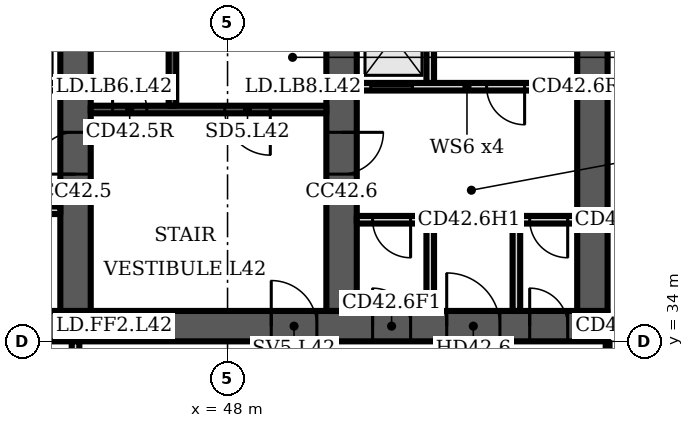
"""IFC4 building model, lengths in metres.
Left out: names, types, materials, properties, quantities, classifications, styles, units other than length and angle.
Written with IfcOpenShell. Run it as: python <this file> out.ifc"""

import sys

from ifc_helpers import new_model, si_unit, direction, frame, frame_2d, origin, place, context, subcontext, project, spatial, polyline, rectangle, outline, extrude, element, fill, save


model = new_model("IFC4")
c1 = context("Model", 3, precision=1e-05, world=origin(), true_north=direction((0.0, 1.0)))
c2 = subcontext(c1, "Body", "Model", "MODEL_VIEW")
j1 = project(units=[si_unit("LENGTHUNIT", "METRE"), si_unit("PLANEANGLEUNIT", "RADIAN")], contexts=[c1])
p1 = place(None, origin())
s1 = spatial("IfcSite", under=j1, at=p1, CompositionType="ELEMENT")
p2 = place(p1, origin())
s2 = spatial("IfcBuilding", under=s1, at=p2, CompositionType="ELEMENT")
p3 = place(p2, frame((0.0, 0.0, 173.5)))
s3 = spatial("IfcBuildingStorey", under=s2, at=p3, CompositionType="ELEMENT", Elevation=173.5)
p4 = place(p3, frame((16.0, 34.4, 0.0), z_axis=(0.0, 0.0, 1.0), x_axis=(1.0, 0.0, 0.0)))
e1 = element("IfcWall", 1, at=p4, inside=s3, PredefinedType="SHEAR", context=c2, shape_type="SweptSolid", body=[
    extrude(rectangle(XDim=42.0, YDim=0.8, at=frame_2d((21.0, 0.0))), origin(), (0.0, 0.0, 1.0), 3.6),
])
p5 = place(p4, frame((3.2, 0.0, 0.0)))
e2 = element("IfcOpeningElement", 2, at=p5, cuts=e1, PredefinedType="OPENING", context=c2, shape_type="SweptSolid", body=[
    extrude(rectangle(XDim=1.0, YDim=2.1, at=frame_2d((0.5, 1.05))), frame((0.0, 0.41, 0.0), z_axis=(0.0, -1.0, 0.0), x_axis=(1.0, 0.0, 0.0)), (0.0, 0.0, 1.0), 0.82),
])
p6 = place(p4, frame((7.65, 0.0, 0.0)))
e3 = element("IfcOpeningElement", 3, at=p6, cuts=e1, PredefinedType="OPENING", context=c2, shape_type="SweptSolid", body=[
    extrude(rectangle(XDim=1.2, YDim=2.1, at=frame_2d((0.6, 1.05))), frame((0.0, 0.41, 0.0), z_axis=(0.0, -1.0, 0.0), x_axis=(1.0, 0.0, 0.0)), (0.0, 0.0, 1.0), 0.82),
])
p7 = place(p4, frame((14.767, 0.0, 0.0)))
e4 = element("IfcOpeningElement", 4, at=p7, cuts=e1, PredefinedType="OPENING", context=c2, shape_type="SweptSolid", body=[
    extrude(rectangle(XDim=1.1, YDim=2.1, at=frame_2d((0.55, 1.05))), frame((0.0, 0.41, 0.0), z_axis=(0.0, -1.0, 0.0), x_axis=(1.0, 0.0, 0.0)), (0.0, 0.0, 1.0), 0.82),
])
p8 = place(p4, frame((19.133, 0.0, 0.0)))
e5 = element("IfcOpeningElement", 5, at=p8, cuts=e1, PredefinedType="OPENING", context=c2, shape_type="SweptSolid", body=[
    extrude(rectangle(XDim=1.1, YDim=2.1, at=frame_2d((0.55, 1.05))), frame((0.0, 0.41, 0.0), z_axis=(0.0, -1.0, 0.0), x_axis=(1.0, 0.0, 0.0)), (0.0, 0.0, 1.0), 0.82),
])
p9 = place(p4, frame((16.8, 0.0, 0.0)))
e6 = element("IfcOpeningElement", 6, at=p9, cuts=e1, PredefinedType="OPENING", context=c2, shape_type="SweptSolid", body=[
    extrude(rectangle(XDim=1.4, YDim=2.1, at=frame_2d((0.7, 1.05))), frame((0.0, 0.41, 0.0), z_axis=(0.0, -1.0, 0.0), x_axis=(1.0, 0.0, 0.0)), (0.0, 0.0, 1.0), 0.82),
])
p10 = place(p4, frame((21.767, 0.0, 0.0)))
e7 = element("IfcOpeningElement", 7, at=p10, cuts=e1, PredefinedType="OPENING", context=c2, shape_type="SweptSolid", body=[
    extrude(rectangle(XDim=1.1, YDim=2.1, at=frame_2d((0.55, 1.05))), frame((0.0, 0.41, 0.0), z_axis=(0.0, -1.0, 0.0), x_axis=(1.0, 0.0, 0.0)), (0.0, 0.0, 1.0), 0.82),
])
p11 = place(p4, frame((23.95, 0.0, 0.0)))
e8 = element("IfcOpeningElement", 8, at=p11, cuts=e1, PredefinedType="OPENING", context=c2, shape_type="SweptSolid", body=[
    extrude(rectangle(XDim=1.1, YDim=2.1, at=frame_2d((0.55, 1.05))), frame((0.0, 0.41, 0.0), z_axis=(0.0, -1.0, 0.0), x_axis=(1.0, 0.0, 0.0)), (0.0, 0.0, 1.0), 0.82),
])
p12 = place(p4, frame((26.133, 0.0, 0.0)))
e9 = element("IfcOpeningElement", 9, at=p12, cuts=e1, PredefinedType="OPENING", context=c2, shape_type="SweptSolid", body=[
    extrude(rectangle(XDim=1.1, YDim=2.1, at=frame_2d((0.55, 1.05))), frame((0.0, 0.41, 0.0), z_axis=(0.0, -1.0, 0.0), x_axis=(1.0, 0.0, 0.0)), (0.0, 0.0, 1.0), 0.82),
])
p13 = place(p4, frame((33.15, 0.0, 0.0)))
e10 = element("IfcOpeningElement", 10, at=p13, cuts=e1, PredefinedType="OPENING", context=c2, shape_type="SweptSolid", body=[
    extrude(rectangle(XDim=1.2, YDim=2.1, at=frame_2d((0.6, 1.05))), frame((0.0, 0.41, 0.0), z_axis=(0.0, -1.0, 0.0), x_axis=(1.0, 0.0, 0.0)), (0.0, 0.0, 1.0), 0.82),
])
p14 = place(p4, frame((35.817, 0.0, 0.0)))
e11 = element("IfcOpeningElement", 11, at=p14, cuts=e1, PredefinedType="OPENING", context=c2, shape_type="SweptSolid", body=[
    extrude(rectangle(XDim=1.0, YDim=2.1, at=frame_2d((0.5, 1.05))), frame((0.0, 0.41, 0.0), z_axis=(0.0, -1.0, 0.0), x_axis=(1.0, 0.0, 0.0)), (0.0, 0.0, 1.0), 0.82),
])
p15 = place(p4, frame((39.95, 0.0, 0.0)))
e12 = element("IfcOpeningElement", 12, at=p15, cuts=e1, PredefinedType="OPENING", context=c2, shape_type="SweptSolid", body=[
    extrude(rectangle(XDim=1.0, YDim=2.1, at=frame_2d((0.5, 1.05))), frame((0.0, 0.41, 0.0), z_axis=(0.0, -1.0, 0.0), x_axis=(1.0, 0.0, 0.0)), (0.0, 0.0, 1.0), 0.82),
])
p16 = place(p4, frame((37.767, 0.0, 0.0)))
e13 = element("IfcOpeningElement", 13, at=p16, cuts=e1, PredefinedType="OPENING", context=c2, shape_type="SweptSolid", body=[
    extrude(rectangle(XDim=1.4, YDim=2.1, at=frame_2d((0.7, 1.05))), frame((0.0, 0.41, 0.0), z_axis=(0.0, -1.0, 0.0), x_axis=(1.0, 0.0, 0.0)), (0.0, 0.0, 1.0), 0.82),
])
p17 = place(p3, frame((44.0, 34.8, 0.0), z_axis=(0.0, 0.0, 1.0), x_axis=(0.0, 1.0, 0.0)))
e14 = element("IfcWall", 14, at=p17, inside=s3, PredefinedType="SHEAR", context=c2, shape_type="SweptSolid", body=[
    extrude(rectangle(XDim=14.374, YDim=0.8, at=frame_2d((7.187, 0.0))), origin(), (0.0, 0.0, 1.0), 3.6),
])
p18 = place(p17, frame((11.312, 0.0, 0.0)))
e15 = element("IfcOpeningElement", 15, at=p18, cuts=e14, PredefinedType="OPENING", context=c2, shape_type="SweptSolid", body=[
    extrude(rectangle(XDim=1.0, YDim=2.1, at=frame_2d((0.5, 1.05))), frame((0.0, 0.41, 0.0), z_axis=(0.0, -1.0, 0.0), x_axis=(1.0, 0.0, 0.0)), (0.0, 0.0, 1.0), 0.82),
])
p19 = place(p17, frame((3.6, 0.0, 0.0)))
e16 = element("IfcOpeningElement", 16, at=p19, cuts=e14, PredefinedType="OPENING", context=c2, shape_type="SweptSolid", body=[
    extrude(rectangle(XDim=1.1, YDim=2.1, at=frame_2d((0.55, 1.05))), frame((0.0, 0.41, 0.0), z_axis=(0.0, -1.0, 0.0), x_axis=(1.0, 0.0, 0.0)), (0.0, 0.0, 1.0), 0.82),
])
p20 = place(p3, frame((51.0, 34.8, 0.0), z_axis=(0.0, 0.0, 1.0), x_axis=(0.0, 1.0, 0.0)))
e17 = element("IfcWall", 17, at=p20, inside=s3, PredefinedType="SHEAR", context=c2, shape_type="SweptSolid", body=[
    extrude(rectangle(XDim=13.762, YDim=0.8, at=frame_2d((6.881, 0.0))), origin(), (0.0, 0.0, 1.0), 3.6),
])
p21 = place(p20, frame((3.6, 0.0, 0.0)))
e18 = element("IfcOpeningElement", 18, at=p21, cuts=e17, PredefinedType="OPENING", context=c2, shape_type="SweptSolid", body=[
    extrude(rectangle(XDim=1.1, YDim=2.1, at=frame_2d((0.55, 1.05))), frame((0.0, 0.41, 0.0), z_axis=(0.0, -1.0, 0.0), x_axis=(1.0, 0.0, 0.0)), (0.0, 0.0, 1.0), 0.82),
])
p22 = place(p3, frame((57.6, 34.8, 0.0), z_axis=(0.0, 0.0, 1.0), x_axis=(0.0, 1.0, 0.0)))
e19 = element("IfcWall", 19, at=p22, inside=s3, PredefinedType="SHEAR", context=c2, shape_type="SweptSolid", body=[
    extrude(rectangle(XDim=13.184, YDim=0.8, at=frame_2d((6.592, 0.0))), origin(), (0.0, 0.0, 1.0), 3.6),
])
p23 = place(p3, frame((37.4, 40.7, 0.0), z_axis=(0.0, 0.0, 1.0), x_axis=(1.0, 0.0, 0.0)))
e20 = element("IfcWall", 20, at=p23, inside=s3, PredefinedType="PARTITIONING", context=c2, shape_type="SweptSolid", body=[
    extrude(rectangle(XDim=6.2, YDim=0.2, at=frame_2d((3.1, 0.0))), origin(), (0.0, 0.0, 1.0), 3.2),
])
p24 = place(p23, frame((0.367, 0.0, 0.0)))
e21 = element("IfcOpeningElement", 21, at=p24, cuts=e20, PredefinedType="OPENING", context=c2, shape_type="SweptSolid", body=[
    extrude(rectangle(XDim=1.1, YDim=2.1, at=frame_2d((0.55, 1.05))), frame((0.0, 0.11, 0.0), z_axis=(0.0, -1.0, 0.0), x_axis=(1.0, 0.0, 0.0)), (0.0, 0.0, 1.0), 0.22),
])
p25 = place(p23, frame((2.55, 0.0, 0.0)))
e22 = element("IfcOpeningElement", 22, at=p25, cuts=e20, PredefinedType="OPENING", context=c2, shape_type="SweptSolid", body=[
    extrude(rectangle(XDim=1.1, YDim=2.1, at=frame_2d((0.55, 1.05))), frame((0.0, 0.11, 0.0), z_axis=(0.0, -1.0, 0.0), x_axis=(1.0, 0.0, 0.0)), (0.0, 0.0, 1.0), 0.22),
])
p26 = place(p23, frame((4.733, 0.0, 0.0)))
e23 = element("IfcOpeningElement", 23, at=p26, cuts=e20, PredefinedType="OPENING", context=c2, shape_type="SweptSolid", body=[
    extrude(rectangle(XDim=1.1, YDim=2.1, at=frame_2d((0.55, 1.05))), frame((0.0, 0.11, 0.0), z_axis=(0.0, -1.0, 0.0), x_axis=(1.0, 0.0, 0.0)), (0.0, 0.0, 1.0), 0.22),
])
p27 = place(p3, frame((0.0, 0.0, -0.0)))
e24 = element("IfcWall", 24, at=p27, inside=s3, PredefinedType="PARTITIONING", context=c2, shape_type="SweptSolid", body=[
    extrude(outline(polyline([(41.567, 37.1), (39.433, 37.1), (39.433, 34.8), (39.233, 34.8), (39.233, 37.65), (37.4, 37.65), (37.4, 37.85), (39.233, 37.85), (39.433, 37.85), (39.433, 37.3), (41.567, 37.3), (41.567, 37.55), (41.767, 37.55), (43.6, 37.55), (43.6, 37.35), (41.767, 37.35), (41.767, 34.8), (41.567, 34.8), (41.567, 37.1)])), origin(), (0.0, 0.0, 1.0), 3.2),
])
p28 = place(p3, frame((0.0, 0.0, -0.0)))
e25 = element("IfcWall", 25, at=p28, inside=s3, PredefinedType="PARTITIONING", context=c2, shape_type="SweptSolid", body=[
    extrude(outline(polyline([(39.433, 40.8), (39.233, 40.8), (39.233, 43.8), (37.4, 43.8), (37.4, 44.0), (43.6, 44.0), (43.6, 43.8), (41.767, 43.8), (41.767, 40.8), (41.567, 40.8), (41.567, 43.8), (39.433, 43.8), (39.433, 40.8)])), origin(), (0.0, 0.0, 1.0), 3.2),
])
p29 = place(p3, frame((44.4, 40.1, 0.0), z_axis=(0.0, 0.0, 1.0), x_axis=(1.0, 0.0, 0.0)))
e26 = element("IfcWall", 26, at=p29, inside=s3, PredefinedType="SHEAR", context=c2, shape_type="SweptSolid", body=[
    extrude(rectangle(XDim=6.2, YDim=0.2, at=frame_2d((3.1, 0.0))), origin(), (0.0, 0.0, 1.0), 3.2),
])
p30 = place(p29, frame((3.525, 0.0, 0.0)))
e27 = element("IfcOpeningElement", 27, at=p30, cuts=e26, PredefinedType="OPENING", context=c2, shape_type="SweptSolid", body=[
    extrude(rectangle(XDim=1.2, YDim=2.1, at=frame_2d((0.6, 1.05))), frame((0.0, 0.11, 0.0), z_axis=(0.0, -1.0, 0.0), x_axis=(1.0, 0.0, 0.0)), (0.0, 0.0, 1.0), 0.22),
])
p31 = place(p29, frame((0.575, 0.0, 0.0)))
e28 = element("IfcOpeningElement", 28, at=p31, cuts=e26, PredefinedType="OPENING", context=c2, shape_type="SweptSolid", body=[
    extrude(rectangle(XDim=0.9, YDim=2.1, at=frame_2d((0.45, 1.05))), frame((0.0, 0.11, 0.0), z_axis=(0.0, -1.0, 0.0), x_axis=(1.0, 0.0, 0.0)), (0.0, 0.0, 1.0), 0.22),
])
p32 = place(p3, frame((46.55, 40.2, 0.0), z_axis=(0.0, 0.0, 1.0), x_axis=(0.0, 1.0, 0.0)))
e29 = element("IfcWall", 29, at=p32, inside=s3, PredefinedType="SHEAR", context=c2, shape_type="SweptSolid", body=[
    extrude(rectangle(XDim=7.2, YDim=0.2, at=frame_2d((3.6, 0.0))), origin(), (0.0, 0.0, 1.0), 3.2),
])
p33 = place(p3, frame((51.4, 37.2, 0.0), z_axis=(0.0, 0.0, 1.0), x_axis=(1.0, 0.0, 0.0)))
e30 = element("IfcWall", 30, at=p33, inside=s3, PredefinedType="PARTITIONING", context=c2, shape_type="SweptSolid", body=[
    extrude(rectangle(XDim=1.833, YDim=0.2, at=frame_2d((0.917, 0.0))), origin(), (0.0, 0.0, 1.0), 3.2),
])
p34 = place(p33, frame((0.417, 0.0, 0.0)))
e31 = element("IfcOpeningElement", 31, at=p34, cuts=e30, PredefinedType="OPENING", context=c2, shape_type="SweptSolid", body=[
    extrude(rectangle(XDim=1.0, YDim=2.1, at=frame_2d((0.5, 1.05))), frame((0.0, 0.11, 0.0), z_axis=(0.0, -1.0, 0.0), x_axis=(1.0, 0.0, 0.0)), (0.0, 0.0, 1.0), 0.22),
])
p35 = place(p3, frame((55.7, 37.2, 0.0), z_axis=(0.0, 0.0, 1.0), x_axis=(1.0, 0.0, 0.0)))
e32 = element("IfcWall", 32, at=p35, inside=s3, PredefinedType="PARTITIONING", context=c2, shape_type="SweptSolid", body=[
    extrude(rectangle(XDim=1.5, YDim=0.2, at=frame_2d((0.75, 0.0))), origin(), (0.0, 0.0, 1.0), 3.2),
])
p36 = place(p35, frame((0.25, 0.0, 0.0)))
e33 = element("IfcOpeningElement", 33, at=p36, cuts=e32, PredefinedType="OPENING", context=c2, shape_type="SweptSolid", body=[
    extrude(rectangle(XDim=1.0, YDim=2.1, at=frame_2d((0.5, 1.05))), frame((0.0, 0.11, 0.0), z_axis=(0.0, -1.0, 0.0), x_axis=(1.0, 0.0, 0.0)), (0.0, 0.0, 1.0), 0.22),
])
p37 = place(p3, frame((51.4, 40.7, 0.0), z_axis=(0.0, 0.0, 1.0), x_axis=(1.0, 0.0, 0.0)))
e34 = element("IfcWall", 34, at=p37, inside=s3, PredefinedType="PARTITIONING", context=c2, shape_type="SweptSolid", body=[
    extrude(rectangle(XDim=5.8, YDim=0.2, at=frame_2d((2.9, 0.0))), origin(), (0.0, 0.0, 1.0), 3.2),
])
p38 = place(p37, frame((0.367, 0.0, 0.0)))
e35 = element("IfcOpeningElement", 35, at=p38, cuts=e34, PredefinedType="OPENING", context=c2, shape_type="SweptSolid", body=[
    extrude(rectangle(XDim=1.1, YDim=2.1, at=frame_2d((0.55, 1.05))), frame((0.0, 0.11, 0.0), z_axis=(0.0, -1.0, 0.0), x_axis=(1.0, 0.0, 0.0)), (0.0, 0.0, 1.0), 0.22),
])
p39 = place(p37, frame((3.417, 0.0, 0.0)))
e36 = element("IfcOpeningElement", 36, at=p39, cuts=e34, PredefinedType="OPENING", context=c2, shape_type="SweptSolid", body=[
    extrude(rectangle(XDim=1.0, YDim=2.1, at=frame_2d((0.5, 1.05))), frame((0.0, 0.11, 0.0), z_axis=(0.0, -1.0, 0.0), x_axis=(1.0, 0.0, 0.0)), (0.0, 0.0, 1.0), 0.22),
])
p40 = place(p3, frame((0.0, 0.0, -0.0)))
e37 = element("IfcWall", 37, at=p40, inside=s3, PredefinedType="PARTITIONING", context=c2, shape_type="SweptSolid", body=[
    extrude(outline(polyline([(53.233, 34.8), (53.233, 37.3), (53.433, 37.3), (53.433, 34.8), (53.233, 34.8)])), origin(), (0.0, 0.0, 1.0), 3.2),
])
p41 = place(p3, frame((0.0, 0.0, -0.0)))
e38 = element("IfcWall", 38, at=p41, inside=s3, PredefinedType="PARTITIONING", context=c2, shape_type="SweptSolid", body=[
    extrude(outline(polyline([(55.5, 34.8), (55.5, 37.3), (55.7, 37.3), (55.7, 34.8), (55.5, 34.8)])), origin(), (0.0, 0.0, 1.0), 3.2),
])
p42 = place(p3, frame((0.0, 0.0, -0.0)))
e39 = element("IfcWall", 39, at=p42, inside=s3, PredefinedType="PARTITIONING", context=c2, shape_type="SweptSolid", body=[
    extrude(outline(polyline([(53.433, 40.8), (53.433, 43.8), (53.233, 43.8), (53.233, 40.8), (53.433, 40.8)])), origin(), (0.0, 0.0, 1.0), 3.2),
])
p43 = place(p3, frame((44.0, 30.5, 0.0), z_axis=(0.0, 0.0, 1.0), x_axis=(0.0, 1.0, 0.0)))
e40 = element("IfcWall", 40, at=p43, inside=s3, PredefinedType="PARTITIONING", context=c2, shape_type="SweptSolid", body=[
    extrude(rectangle(XDim=3.5, YDim=0.2, at=frame_2d((1.75, 0.0))), origin(), (0.0, 0.0, 1.0), 3.2),
])
p44 = place(p43, frame((1.2, 0.0, 0.0)))
e41 = element("IfcOpeningElement", 41, at=p44, cuts=e40, PredefinedType="OPENING", context=c2, shape_type="SweptSolid", body=[
    extrude(rectangle(XDim=1.1, YDim=2.1, at=frame_2d((0.55, 1.05))), frame((0.0, 0.11, 0.0), z_axis=(0.0, -1.0, 0.0), x_axis=(1.0, 0.0, 0.0)), (0.0, 0.0, 1.0), 0.22),
])
p45 = place(p3, frame((58.0, 31.4, 0.0), z_axis=(0.0, 0.0, 1.0), x_axis=(0.0, 1.0, 0.0)))
e42 = element("IfcWall", 42, at=p45, inside=s3, PredefinedType="PARTITIONING", context=c2, shape_type="SweptSolid", body=[
    extrude(rectangle(XDim=2.58, YDim=0.1, at=frame_2d((1.29, 0.0))), origin(), (0.0, 0.0, 1.0), 3.2),
])
p46 = place(p30, origin())
e43 = element("IfcDoor", 43, at=p46, inside=s3, OperationType="SINGLE_SWING_RIGHT", PredefinedType="DOOR", context=c2, shape_type="SweptSolid", body=[
    extrude(rectangle(XDim=1.2, YDim=2.1, at=frame_2d((0.6, 1.05))), frame((0.0, 0.025, 0.0), z_axis=(0.0, -1.0, 0.0), x_axis=(1.0, 0.0, 0.0)), (0.0, 0.0, 1.0), 0.05),
])
fill(e27, e43)
p47 = place(p31, origin())
e44 = element("IfcDoor", 44, at=p47, inside=s3, OperationType="SINGLE_SWING_LEFT", PredefinedType="DOOR", context=c2, shape_type="SweptSolid", body=[
    extrude(rectangle(XDim=0.9, YDim=2.1, at=frame_2d((0.45, 1.05))), frame((0.0, 0.025, 0.0), z_axis=(0.0, -1.0, 0.0), x_axis=(1.0, 0.0, 0.0)), (0.0, 0.0, 1.0), 0.05),
])
fill(e28, e44)
p48 = place(p13, origin())
e45 = element("IfcDoor", 45, at=p48, inside=s3, OperationType="SINGLE_SWING_LEFT", PredefinedType="DOOR", context=c2, shape_type="SweptSolid", body=[
    extrude(rectangle(XDim=1.2, YDim=2.1, at=frame_2d((0.6, 1.05))), frame((0.0, 0.025, 0.0), z_axis=(0.0, -1.0, 0.0), x_axis=(1.0, 0.0, 0.0)), (0.0, 0.0, 1.0), 0.05),
])
fill(e10, e45)
p49 = place(p14, origin())
e46 = element("IfcDoor", 46, at=p49, inside=s3, OperationType="SINGLE_SWING_LEFT", PredefinedType="DOOR", context=c2, shape_type="SweptSolid", body=[
    extrude(rectangle(XDim=1.0, YDim=2.1, at=frame_2d((0.5, 1.05))), frame((0.0, 0.4, 0.0), z_axis=(0.0, -1.0, 0.0), x_axis=(1.0, 0.0, 0.0)), (0.0, 0.0, 1.0), 0.8),
])
fill(e11, e46)
p50 = place(p34, origin())
e47 = element("IfcDoor", 47, at=p50, inside=s3, OperationType="SINGLE_SWING_RIGHT", PredefinedType="DOOR", context=c2, shape_type="SweptSolid", body=[
    extrude(rectangle(XDim=1.0, YDim=2.1, at=frame_2d((0.5, 1.05))), frame((0.0, 0.025, 0.0), z_axis=(0.0, -1.0, 0.0), x_axis=(1.0, 0.0, 0.0)), (0.0, 0.0, 1.0), 0.05),
])
fill(e31, e47)
p51 = place(p15, origin())
e48 = element("IfcDoor", 48, at=p51, inside=s3, OperationType="SINGLE_SWING_LEFT", PredefinedType="DOOR", context=c2, shape_type="SweptSolid", body=[
    extrude(rectangle(XDim=1.0, YDim=2.1, at=frame_2d((0.5, 1.05))), frame((0.0, 0.4, 0.0), z_axis=(0.0, -1.0, 0.0), x_axis=(1.0, 0.0, 0.0)), (0.0, 0.0, 1.0), 0.8),
])
fill(e12, e48)
p52 = place(p36, origin())
e49 = element("IfcDoor", 49, at=p52, inside=s3, OperationType="SINGLE_SWING_RIGHT", PredefinedType="DOOR", context=c2, shape_type="SweptSolid", body=[
    extrude(rectangle(XDim=1.0, YDim=2.1, at=frame_2d((0.5, 1.05))), frame((0.0, 0.025, 0.0), z_axis=(0.0, -1.0, 0.0), x_axis=(1.0, 0.0, 0.0)), (0.0, 0.0, 1.0), 0.05),
])
fill(e33, e49)
p53 = place(p16, origin())
e50 = element("IfcDoor", 50, at=p53, inside=s3, OperationType="DOUBLE_DOOR_SINGLE_SWING", PredefinedType="DOOR", context=c2, shape_type="SweptSolid", body=[
    extrude(rectangle(XDim=1.4, YDim=2.1, at=frame_2d((0.7, 1.05))), frame((0.0, 0.025, 0.0), z_axis=(0.0, -1.0, 0.0), x_axis=(1.0, 0.0, 0.0)), (0.0, 0.0, 1.0), 0.05),
])
fill(e13, e50)
p54 = place(p38, origin())
e51 = element("IfcDoor", 51, at=p54, inside=s3, OperationType="DOUBLE_DOOR_SLIDING", PredefinedType="DOOR", context=c2, shape_type="SweptSolid", body=[
    extrude(rectangle(XDim=1.1, YDim=2.1, at=frame_2d((0.55, 1.05))), frame((0.0, 0.025, 0.0), z_axis=(0.0, -1.0, 0.0), x_axis=(1.0, 0.0, 0.0)), (0.0, 0.0, 1.0), 0.05),
])
fill(e35, e51)
p55 = place(p39, origin())
e52 = element("IfcDoor", 52, at=p55, inside=s3, OperationType="SINGLE_SWING_RIGHT", PredefinedType="DOOR", context=c2, shape_type="SweptSolid", body=[
    extrude(rectangle(XDim=1.0, YDim=2.1, at=frame_2d((0.5, 1.05))), frame((0.0, 0.025, 0.0), z_axis=(0.0, -1.0, 0.0), x_axis=(1.0, 0.0, 0.0)), (0.0, 0.0, 1.0), 0.05),
])
fill(e36, e52)
p56 = place(p19, origin())
e53 = element("IfcDoor", 53, at=p56, inside=s3, OperationType="SINGLE_SWING_LEFT", PredefinedType="DOOR", context=c2, shape_type="SweptSolid", body=[
    extrude(rectangle(XDim=1.1, YDim=2.1, at=frame_2d((0.55, 1.05))), frame((0.0, 0.025, 0.0), z_axis=(0.0, -1.0, 0.0), x_axis=(1.0, 0.0, 0.0)), (0.0, 0.0, 1.0), 0.05),
])
fill(e16, e53)
p57 = place(p21, origin())
e54 = element("IfcDoor", 54, at=p57, inside=s3, OperationType="SINGLE_SWING_RIGHT", PredefinedType="DOOR", context=c2, shape_type="SweptSolid", body=[
    extrude(rectangle(XDim=1.1, YDim=2.1, at=frame_2d((0.55, 1.05))), frame((0.0, 0.025, 0.0), z_axis=(0.0, -1.0, 0.0), x_axis=(1.0, 0.0, 0.0)), (0.0, 0.0, 1.0), 0.05),
])
fill(e18, e54)
save(model, sys.argv[1])
